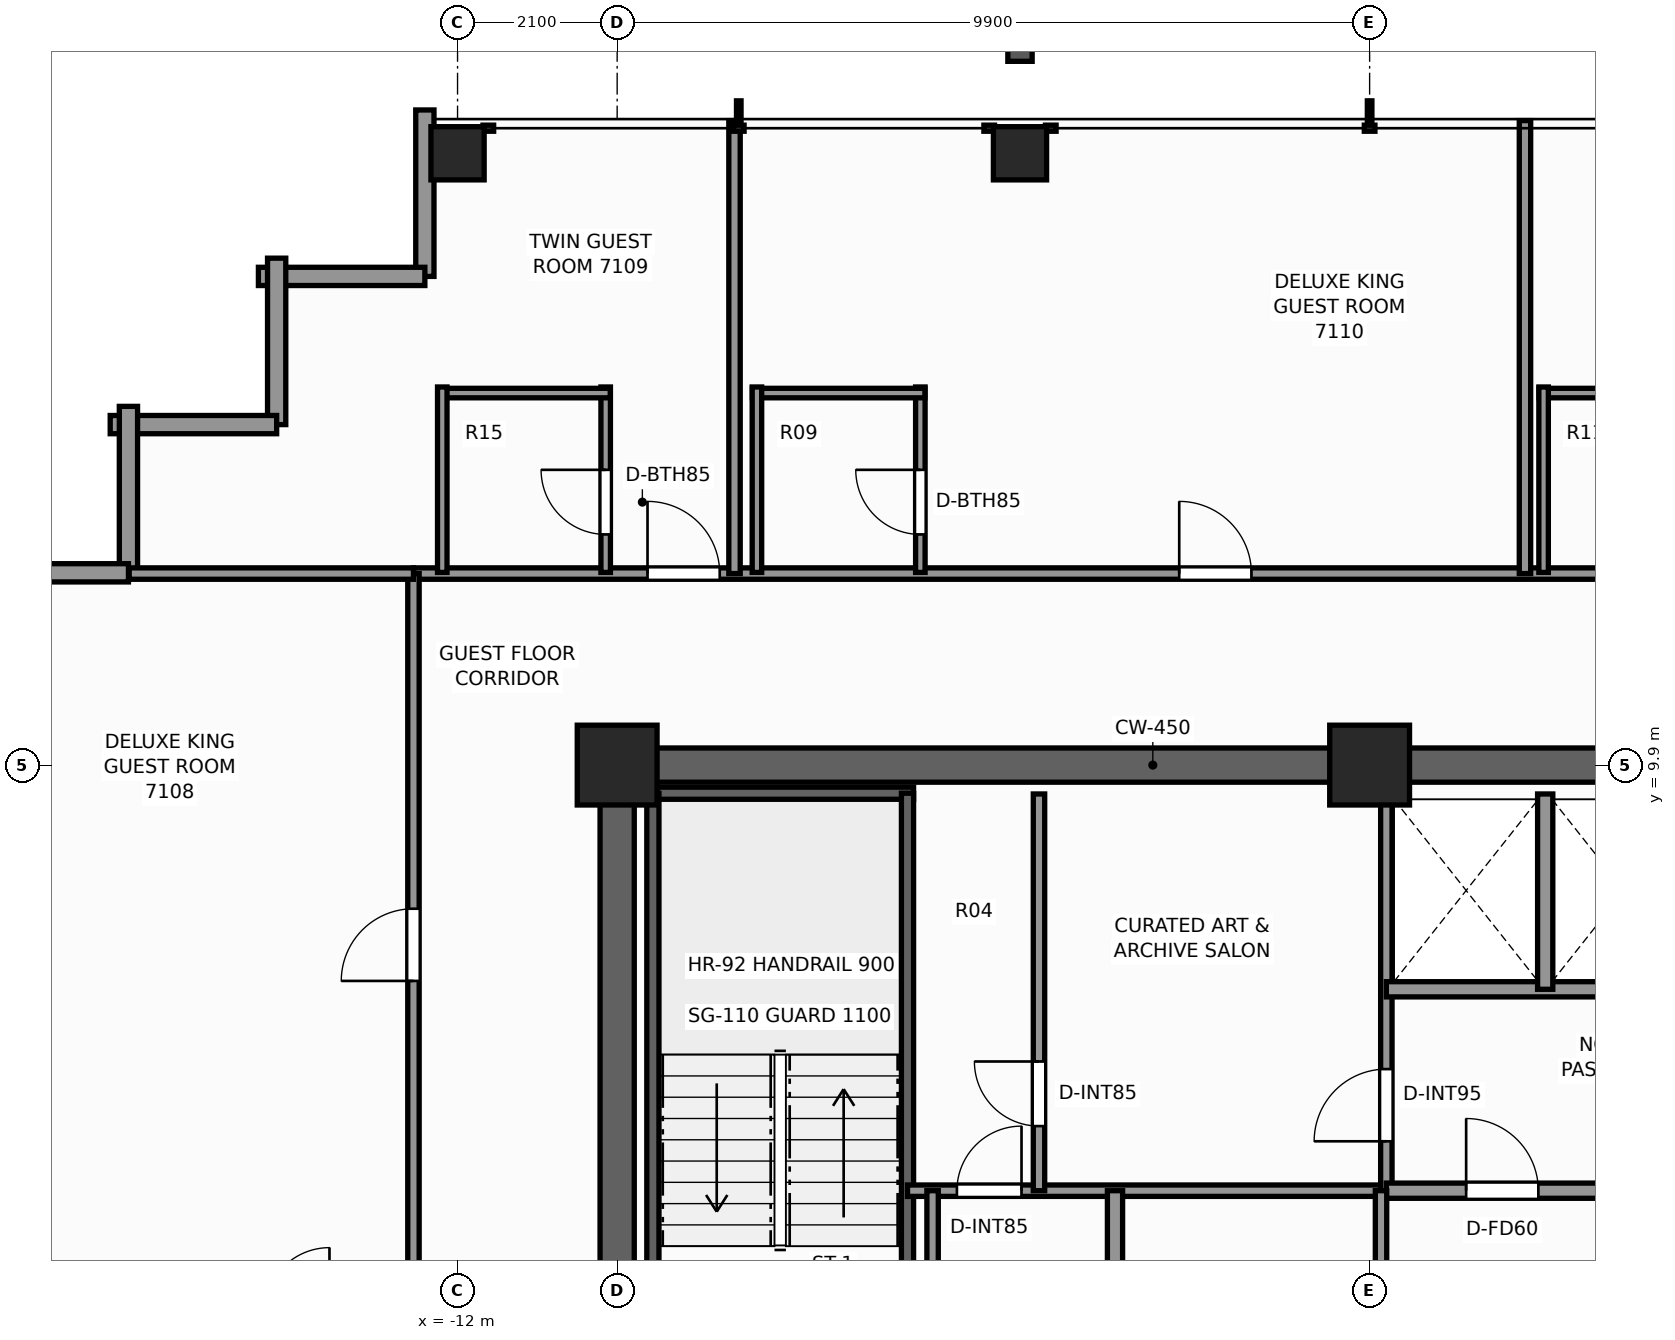
"""IFC4 building model, lengths in metres.
Left out: names, types, materials, properties, quantities, classifications, styles, units other than length and angle.
Written with IfcOpenShell. Run it as: python <this file> out.ifc"""

import sys

from ifc_helpers import new_model, si_unit, direction, frame, frame_2d, origin, origin_2d, place, context, subcontext, project, spatial, rectangle, extrude, element, fill, save


model = new_model("IFC4")
c1 = context("Model", 3, precision=1e-05, world=origin(), true_north=direction((0.0, 1.0)))
c2 = subcontext(c1, "Body", "Model", "MODEL_VIEW")
j1 = project(units=[si_unit("LENGTHUNIT", "METRE"), si_unit("PLANEANGLEUNIT", "RADIAN")], contexts=[c1])
p1 = place(None, origin())
s1 = spatial("IfcSite", under=j1, at=p1, CompositionType="ELEMENT")
p2 = place(p1, origin())
s2 = spatial("IfcBuilding", under=s1, at=p2, CompositionType="ELEMENT")
p3 = place(p2, frame((0.0, 0.0, 244.4)))
s3 = spatial("IfcBuildingStorey", under=s2, at=p3, CompositionType="ELEMENT", Elevation=244.4)
p4 = place(p3, frame((-10.125, 9.9, 0.0), z_axis=(0.0, 0.0, 1.0), x_axis=(1.0, 0.0, 0.0)))
e1 = element("IfcWall", 1, at=p4, inside=s3, PredefinedType="SHEAR", context=c2, shape_type="SweptSolid", body=[
    extrude(rectangle(XDim=14.545, YDim=0.45, at=frame_2d((7.272, 0.0))), origin(), (0.0, 0.0, 1.0), 3.5),
])
p5 = place(p3, frame((-9.9, -3.7, 0.0), z_axis=(0.0, 0.0, 1.0), x_axis=(0.0, 1.0, 0.0)))
e2 = element("IfcWall", 2, at=p5, inside=s3, PredefinedType="SHEAR", context=c2, shape_type="SweptSolid", body=[
    extrude(rectangle(XDim=13.375, YDim=0.45, at=frame_2d((6.688, 0.0))), origin(), (0.0, 0.0, 1.0), 3.5),
])
p6 = place(p5, frame((0.35, 0.0, 0.0)))
e3 = element("IfcOpeningElement", 3, at=p6, cuts=e2, PredefinedType="OPENING", context=c2, shape_type="SweptSolid", body=[
    extrude(rectangle(XDim=1.1, YDim=2.2, at=frame_2d((0.55, 1.1))), frame((0.0, 0.235, 0.0), z_axis=(0.0, -1.0, 0.0), x_axis=(1.0, 0.0, 0.0)), (0.0, 0.0, 1.0), 0.47),
])
for number, where, z_axis, x_axis in (
    (4, (-9.9, 9.9, 0.0), (0.0, 0.0, 1.0), (1.0, 0.0, 0.0)),
    (5, (0.0, 9.9, 0.0), (0.0, 0.0, 1.0), (1.0, 0.0, 0.0)),
):
    element("IfcColumn", number, at=place(p3, frame(where, z_axis=z_axis, x_axis=x_axis)), inside=s3, PredefinedType="COLUMN", context=c2, shape_type="SweptSolid", body=[
        extrude(rectangle(XDim=1.05, YDim=1.05, at=origin_2d()), origin(), (0.0, 0.0, 1.0), 3.5),
    ])
for number, where, z_axis, x_axis in (
    (6, (-12.0, 17.95, 0.0), (0.0, 0.0, 1.0), (1.0, 0.0, 0.0)),
    (7, (-4.6, 17.95, 0.0), (0.0, 0.0, 1.0), (1.0, 0.0, 0.0)),
):
    element("IfcColumn", number, at=place(p3, frame(where, z_axis=z_axis, x_axis=x_axis)), inside=s3, PredefinedType="COLUMN", context=c2, shape_type="SweptSolid", body=[
        extrude(rectangle(XDim=0.7, YDim=0.7, at=origin_2d()), origin(), (0.0, 0.0, 1.0), 3.5),
    ])
p7 = place(p3, frame((-12.43, 16.33, 0.0), z_axis=(0.0, 0.0, 1.0), x_axis=(0.0, 1.0, 0.0)))
e8 = element("IfcWall", 8, at=p7, inside=s3, PredefinedType="STANDARD", context=c2, shape_type="SweptSolid", body=[
    extrude(rectangle(XDim=2.19, YDim=0.24, at=frame_2d((1.095, 0.0))), origin(), (0.0, 0.0, 1.0), 2.633),
])
for number, where, z_axis, x_axis in (
    (9, (-14.62, 16.33, 0.0), (0.0, 0.0, 1.0), (1.0, 0.0, 0.0)),
    (10, (-14.38, 14.38, 0.0), (0.0, 0.0, 1.0), (0.0, 1.0, 0.0)),
    (11, (-16.57, 14.38, 0.0), (0.0, 0.0, 1.0), (1.0, 0.0, 0.0)),
    (12, (-16.33, 12.43, 0.0), (0.0, 0.0, 1.0), (0.0, 1.0, 0.0)),
):
    element("IfcWall", number, at=place(p3, frame(where, z_axis=z_axis, x_axis=x_axis)), inside=s3, PredefinedType="STANDARD", context=c2, shape_type="SweptSolid", body=[
        extrude(rectangle(XDim=2.19, YDim=0.24, at=frame_2d((1.095, 0.0))), origin(), (0.0, 0.0, 1.0), 2.633),
    ])
p8 = place(p3, frame((-18.52, 12.43, 0.0), z_axis=(0.0, 0.0, 1.0), x_axis=(1.0, 0.0, 0.0)))
e13 = element("IfcWall", 13, at=p8, inside=s3, PredefinedType="STANDARD", context=c2, shape_type="SweptSolid", body=[
    extrude(rectangle(XDim=2.19, YDim=0.24, at=frame_2d((1.095, 0.0))), origin(), (0.0, 0.0, 1.0), 2.633),
])
p9 = place(p3, frame((-9.52, 9.53, 0.0), z_axis=(0.0, 0.0, 1.0), x_axis=(1.0, 0.0, 0.0)))
e14 = element("IfcWall", 14, at=p9, inside=s3, PredefinedType="SHEAR", context=c2, shape_type="SweptSolid", body=[
    extrude(rectangle(XDim=3.52, YDim=0.16, at=frame_2d((1.76, 0.0))), origin(), (0.0, 0.0, 1.0), 3.5),
])
for number, where, z_axis, x_axis in (
    (15, (-9.43, 1.97, 0.0), (0.0, 0.0, 1.0), (0.0, 1.0, 0.0)),
    (16, (-6.08, 1.97, 0.0), (0.0, 0.0, 1.0), (0.0, 1.0, 0.0)),
):
    element("IfcWall", number, at=place(p3, frame(where, z_axis=z_axis, x_axis=x_axis)), inside=s3, PredefinedType="SHEAR", context=c2, shape_type="SweptSolid", body=[
        extrude(rectangle(XDim=7.56, YDim=0.16, at=frame_2d((3.78, 0.0))), origin(), (0.0, 0.0, 1.0), 3.5),
    ])
p10 = place(p3, frame((-6.08, 4.3, 0.0), z_axis=(0.0, 0.0, 1.0), x_axis=(1.0, 0.0, 0.0)))
e17 = element("IfcWall", 17, at=p10, inside=s3, PredefinedType="PARTITIONING", context=c2, shape_type="SweptSolid", body=[
    extrude(rectangle(XDim=6.3, YDim=0.15, at=frame_2d((3.15, 0.0))), origin(), (0.0, 0.0, 1.0), 3.25),
])
p11 = place(p10, frame((0.65, 0.0, 0.0)))
e18 = element("IfcOpeningElement", 18, at=p11, cuts=e17, PredefinedType="OPENING", context=c2, shape_type="SweptSolid", body=[
    extrude(rectangle(XDim=0.85, YDim=2.03, at=frame_2d((0.425, 1.015))), frame((0.0, 0.085, 0.0), z_axis=(0.0, -1.0, 0.0), x_axis=(1.0, 0.0, 0.0)), (0.0, 0.0, 1.0), 0.17),
])
p12 = place(p3, frame((0.22, 4.3, 0.0), z_axis=(0.0, 0.0, 1.0), x_axis=(0.0, 1.0, 0.0)))
e19 = element("IfcWall", 19, at=p12, inside=s3, PredefinedType="PARTITIONING", context=c2, shape_type="SweptSolid", body=[
    extrude(rectangle(XDim=5.22, YDim=0.15, at=frame_2d((2.61, 0.0))), origin(), (0.0, 0.0, 1.0), 3.25),
])
p13 = place(p12, frame((0.65, 0.0, 0.0)))
e20 = element("IfcOpeningElement", 20, at=p13, cuts=e19, PredefinedType="OPENING", context=c2, shape_type="SweptSolid", body=[
    extrude(rectangle(XDim=0.95, YDim=2.06, at=frame_2d((0.475, 1.03))), frame((0.0, 0.085, 0.0), z_axis=(0.0, -1.0, 0.0), x_axis=(1.0, 0.0, 0.0)), (0.0, 0.0, 1.0), 0.17),
])
p14 = place(p3, frame((-4.35, 4.3, 0.0), z_axis=(0.0, 0.0, 1.0), x_axis=(0.0, 1.0, 0.0)))
e21 = element("IfcWall", 21, at=p14, inside=s3, PredefinedType="PARTITIONING", context=c2, shape_type="SweptSolid", body=[
    extrude(rectangle(XDim=5.22, YDim=0.15, at=frame_2d((2.61, 0.0))), origin(), (0.0, 0.0, 1.0), 3.25),
])
p15 = place(p14, frame((0.85, 0.0, 0.0)))
e22 = element("IfcOpeningElement", 22, at=p15, cuts=e21, PredefinedType="OPENING", context=c2, shape_type="SweptSolid", body=[
    extrude(rectangle(XDim=0.85, YDim=2.03, at=frame_2d((0.425, 1.015))), frame((0.0, 0.085, 0.0), z_axis=(0.0, -1.0, 0.0), x_axis=(1.0, 0.0, 0.0)), (0.0, 0.0, 1.0), 0.17),
])
p16 = place(p3, frame((0.22, 6.95, 0.0), z_axis=(0.0, 0.0, 1.0), x_axis=(1.0, 0.0, 0.0)))
e23 = element("IfcWall", 23, at=p16, inside=s3, PredefinedType="SOLIDWALL", context=c2, shape_type="SweptSolid", body=[
    extrude(rectangle(XDim=4.18, YDim=0.2, at=frame_2d((2.09, 0.0))), origin(), (0.0, 0.0, 1.0), 3.25),
])
p17 = place(p3, frame((2.31, 6.95, 0.0), z_axis=(0.0, 0.0, 1.0), x_axis=(0.0, 1.0, 0.0)))
e24 = element("IfcWall", 24, at=p17, inside=s3, PredefinedType="SOLIDWALL", context=c2, shape_type="SweptSolid", body=[
    extrude(rectangle(XDim=2.57, YDim=0.2, at=frame_2d((1.285, 0.0))), origin(), (0.0, 0.0, 1.0), 3.25),
])
p18 = place(p3, frame((0.22, 4.3, 0.0), z_axis=(0.0, 0.0, 1.0), x_axis=(1.0, 0.0, 0.0)))
e25 = element("IfcWall", 25, at=p18, inside=s3, PredefinedType="SOLIDWALL", context=c2, shape_type="SweptSolid", body=[
    extrude(rectangle(XDim=3.13, YDim=0.2, at=frame_2d((1.565, 0.0))), origin(), (0.0, 0.0, 1.0), 3.25),
])
p19 = place(p18, frame((1.05, 0.0, 0.0)))
e26 = element("IfcOpeningElement", 26, at=p19, cuts=e25, PredefinedType="OPENING", context=c2, shape_type="SweptSolid", body=[
    extrude(rectangle(XDim=0.95, YDim=2.06, at=frame_2d((0.475, 1.03))), frame((0.0, 0.11, 0.0), z_axis=(0.0, -1.0, 0.0), x_axis=(1.0, 0.0, 0.0)), (0.0, 0.0, 1.0), 0.22),
])
p20 = place(p3, frame((-3.35, 1.1, 0.0), z_axis=(0.0, 0.0, 1.0), x_axis=(0.0, 1.0, 0.0)))
e27 = element("IfcWall", 27, at=p20, inside=s3, PredefinedType="SOLIDWALL", context=c2, shape_type="SweptSolid", body=[
    extrude(rectangle(XDim=3.2, YDim=0.2, at=frame_2d((1.6, 0.0))), origin(), (0.0, 0.0, 1.0), 3.25),
])
p21 = place(p3, frame((0.15, -1.7, 0.0), z_axis=(0.0, 0.0, 1.0), x_axis=(0.0, 1.0, 0.0)))
e28 = element("IfcWall", 28, at=p21, inside=s3, PredefinedType="PARTITIONING", context=c2, shape_type="SweptSolid", body=[
    extrude(rectangle(XDim=6.0, YDim=0.15, at=frame_2d((3.0, 0.0))), origin(), (0.0, 0.0, 1.0), 3.25),
])
p22 = place(p21, frame((3.6, 0.0, 0.0)))
e29 = element("IfcOpeningElement", 29, at=p22, cuts=e28, PredefinedType="OPENING", context=c2, shape_type="SweptSolid", body=[
    extrude(rectangle(XDim=0.85, YDim=2.03, at=frame_2d((0.425, 1.015))), frame((0.0, 0.085, 0.0), z_axis=(0.0, -1.0, 0.0), x_axis=(1.0, 0.0, 0.0)), (0.0, 0.0, 1.0), 0.17),
])
p23 = place(p3, frame((-5.75, 1.97, 0.0), z_axis=(0.0, 0.0, 1.0), x_axis=(0.0, 1.0, 0.0)))
e30 = element("IfcWall", 30, at=p23, inside=s3, PredefinedType="PARTITIONING", context=c2, shape_type="SweptSolid", body=[
    extrude(rectangle(XDim=2.33, YDim=0.15, at=frame_2d((1.165, 0.0))), origin(), (0.0, 0.0, 1.0), 3.25),
])
p24 = place(p3, frame((-12.58, 12.42, 0.0), z_axis=(0.0, 0.0, 1.0), x_axis=(1.0, 0.0, 0.0)))
e31 = element("IfcWall", 31, at=p24, inside=s3, PredefinedType="PARTITIONING", context=c2, shape_type="SweptSolid", body=[
    extrude(rectangle(XDim=24.84, YDim=0.15, at=frame_2d((12.42, 0.0))), origin(), (0.0, 0.0, 1.0), 2.539),
])
p25 = place(p24, frame((3.079, 0.0, 0.0)))
e32 = element("IfcOpeningElement", 32, at=p25, cuts=e31, PredefinedType="OPENING", context=c2, shape_type="SweptSolid", body=[
    extrude(rectangle(XDim=0.95, YDim=2.06, at=frame_2d((0.475, 1.03))), frame((0.0, 0.085, 0.0), z_axis=(0.0, -1.0, 0.0), x_axis=(1.0, 0.0, 0.0)), (0.0, 0.0, 1.0), 0.17),
])
p26 = place(p24, frame((10.075, 0.0, 0.0)))
e33 = element("IfcOpeningElement", 33, at=p26, cuts=e31, PredefinedType="OPENING", context=c2, shape_type="SweptSolid", body=[
    extrude(rectangle(XDim=0.95, YDim=2.06, at=frame_2d((0.475, 1.03))), frame((0.0, 0.085, 0.0), z_axis=(0.0, -1.0, 0.0), x_axis=(1.0, 0.0, 0.0)), (0.0, 0.0, 1.0), 0.17),
])
p27 = place(p24, frame((19.64, 0.0, 0.0)))
e34 = element("IfcOpeningElement", 34, at=p27, cuts=e31, PredefinedType="OPENING", context=c2, shape_type="SweptSolid", body=[
    extrude(rectangle(XDim=0.95, YDim=2.06, at=frame_2d((0.475, 1.03))), frame((0.0, 0.085, 0.0), z_axis=(0.0, -1.0, 0.0), x_axis=(1.0, 0.0, 0.0)), (0.0, 0.0, 1.0), 0.17),
])
p28 = place(p3, frame((-12.58, -12.42, 0.0), z_axis=(0.0, 0.0, 1.0), x_axis=(0.0, 1.0, 0.0)))
e35 = element("IfcWall", 35, at=p28, inside=s3, PredefinedType="PARTITIONING", context=c2, shape_type="SweptSolid", body=[
    extrude(rectangle(XDim=24.84, YDim=0.15, at=frame_2d((12.42, 0.0))), origin(), (0.0, 0.0, 1.0), 2.539),
])
p29 = place(p28, frame((4.475, 0.0, 0.0)))
e36 = element("IfcOpeningElement", 36, at=p29, cuts=e35, PredefinedType="OPENING", context=c2, shape_type="SweptSolid", body=[
    extrude(rectangle(XDim=0.95, YDim=2.06, at=frame_2d((0.475, 1.03))), frame((0.0, 0.085, 0.0), z_axis=(0.0, -1.0, 0.0), x_axis=(1.0, 0.0, 0.0)), (0.0, 0.0, 1.0), 0.17),
])
p30 = place(p28, frame((19.48, 0.0, 0.0)))
e37 = element("IfcOpeningElement", 37, at=p30, cuts=e35, PredefinedType="OPENING", context=c2, shape_type="SweptSolid", body=[
    extrude(rectangle(XDim=0.95, YDim=2.06, at=frame_2d((0.475, 1.03))), frame((0.0, 0.085, 0.0), z_axis=(0.0, -1.0, 0.0), x_axis=(1.0, 0.0, 0.0)), (0.0, 0.0, 1.0), 0.17),
])
p31 = place(p3, frame((-16.32, 12.42, 0.0), z_axis=(0.0, 0.0, 1.0), x_axis=(1.0, 0.0, 0.0)))
e38 = element("IfcWall", 38, at=p31, inside=s3, PredefinedType="PARTITIONING", context=c2, shape_type="SweptSolid", body=[
    extrude(rectangle(XDim=3.74, YDim=0.15, at=frame_2d((1.87, 0.0))), origin(), (0.0, 0.0, 1.0), 3.25),
])
p32 = place(p3, frame((-8.356, 12.42, 0.0), z_axis=(0.0, 0.0, 1.0), x_axis=(0.0, 1.0, 0.0)))
e39 = element("IfcWall", 39, at=p32, inside=s3, PredefinedType="PARTITIONING", context=c2, shape_type="SweptSolid", body=[
    extrude(rectangle(XDim=5.96, YDim=0.15, at=frame_2d((2.98, 0.0))), origin(), (0.0, 0.0, 1.0), 2.623),
])
p33 = place(p3, frame((-10.051, 12.435, 0.0), z_axis=(0.0, 0.0, 1.0), x_axis=(0.0, 1.0, 0.0)))
e40 = element("IfcWall", 40, at=p33, inside=s3, PredefinedType="PARTITIONING", context=c2, shape_type="SweptSolid", body=[
    extrude(rectangle(XDim=2.44, YDim=0.125, at=frame_2d((1.22, 0.0))), origin(), (0.0, 0.0, 1.0), 3.25),
])
p34 = place(p33, frame((0.5, 0.0, 0.0)))
e41 = element("IfcOpeningElement", 41, at=p34, cuts=e40, PredefinedType="OPENING", context=c2, shape_type="SweptSolid", body=[
    extrude(rectangle(XDim=0.85, YDim=2.03, at=frame_2d((0.425, 1.015))), frame((0.0, 0.073, 0.0), z_axis=(0.0, -1.0, 0.0), x_axis=(1.0, 0.0, 0.0)), (0.0, 0.0, 1.0), 0.145),
])
p35 = place(p3, frame((-12.261, 14.795, 0.0), z_axis=(0.0, 0.0, 1.0), x_axis=(1.0, 0.0, 0.0)))
e42 = element("IfcWall", 42, at=p35, inside=s3, PredefinedType="PARTITIONING", context=c2, shape_type="SweptSolid", body=[
    extrude(rectangle(XDim=2.27, YDim=0.125, at=frame_2d((1.135, 0.0))), origin(), (0.0, 0.0, 1.0), 2.539),
])
p36 = place(p3, frame((-12.201, 12.435, 0.0), z_axis=(0.0, 0.0, 1.0), x_axis=(0.0, 1.0, 0.0)))
e43 = element("IfcWall", 43, at=p36, inside=s3, PredefinedType="PARTITIONING", context=c2, shape_type="SweptSolid", body=[
    extrude(rectangle(XDim=2.44, YDim=0.125, at=frame_2d((1.22, 0.0))), origin(), (0.0, 0.0, 1.0), 3.25),
])
p37 = place(p3, frame((2.044, 12.42, 0.0), z_axis=(0.0, 0.0, 1.0), x_axis=(0.0, 1.0, 0.0)))
e44 = element("IfcWall", 44, at=p37, inside=s3, PredefinedType="PARTITIONING", context=c2, shape_type="SweptSolid", body=[
    extrude(rectangle(XDim=5.96, YDim=0.15, at=frame_2d((2.98, 0.0))), origin(), (0.0, 0.0, 1.0), 2.623),
])
p38 = place(p3, frame((-5.911, 12.435, 0.0), z_axis=(0.0, 0.0, 1.0), x_axis=(0.0, 1.0, 0.0)))
e45 = element("IfcWall", 45, at=p38, inside=s3, PredefinedType="PARTITIONING", context=c2, shape_type="SweptSolid", body=[
    extrude(rectangle(XDim=2.44, YDim=0.125, at=frame_2d((1.22, 0.0))), origin(), (0.0, 0.0, 1.0), 3.25),
])
p39 = place(p38, frame((0.5, 0.0, 0.0)))
e46 = element("IfcOpeningElement", 46, at=p39, cuts=e45, PredefinedType="OPENING", context=c2, shape_type="SweptSolid", body=[
    extrude(rectangle(XDim=0.85, YDim=2.03, at=frame_2d((0.425, 1.015))), frame((0.0, 0.073, 0.0), z_axis=(0.0, -1.0, 0.0), x_axis=(1.0, 0.0, 0.0)), (0.0, 0.0, 1.0), 0.145),
])
p40 = place(p3, frame((-8.121, 14.795, 0.0), z_axis=(0.0, 0.0, 1.0), x_axis=(1.0, 0.0, 0.0)))
e47 = element("IfcWall", 47, at=p40, inside=s3, PredefinedType="PARTITIONING", context=c2, shape_type="SweptSolid", body=[
    extrude(rectangle(XDim=2.27, YDim=0.125, at=frame_2d((1.135, 0.0))), origin(), (0.0, 0.0, 1.0), 3.25),
])
p41 = place(p3, frame((-8.061, 12.435, 0.0), z_axis=(0.0, 0.0, 1.0), x_axis=(0.0, 1.0, 0.0)))
e48 = element("IfcWall", 48, at=p41, inside=s3, PredefinedType="PARTITIONING", context=c2, shape_type="SweptSolid", body=[
    extrude(rectangle(XDim=2.44, YDim=0.125, at=frame_2d((1.22, 0.0))), origin(), (0.0, 0.0, 1.0), 3.25),
])
p42 = place(p3, frame((2.229, 14.795, 0.0), z_axis=(0.0, 0.0, 1.0), x_axis=(1.0, 0.0, 0.0)))
e49 = element("IfcWall", 49, at=p42, inside=s3, PredefinedType="PARTITIONING", context=c2, shape_type="SweptSolid", body=[
    extrude(rectangle(XDim=2.27, YDim=0.125, at=frame_2d((1.135, 0.0))), origin(), (0.0, 0.0, 1.0), 2.539),
])
p43 = place(p3, frame((2.289, 12.435, 0.0), z_axis=(0.0, 0.0, 1.0), x_axis=(0.0, 1.0, 0.0)))
e50 = element("IfcWall", 50, at=p43, inside=s3, PredefinedType="PARTITIONING", context=c2, shape_type="SweptSolid", body=[
    extrude(rectangle(XDim=2.44, YDim=0.125, at=frame_2d((1.22, 0.0))), origin(), (0.0, 0.0, 1.0), 3.25),
])
p44 = place(p13, origin())
e51 = element("IfcDoor", 51, at=p44, inside=s3, OperationType="SINGLE_SWING_LEFT", PredefinedType="DOOR", context=c2, shape_type="SweptSolid", body=[
    extrude(rectangle(XDim=0.95, YDim=2.06, at=frame_2d((0.475, 1.03))), frame((0.0, 0.025, 0.0), z_axis=(0.0, -1.0, 0.0), x_axis=(1.0, 0.0, 0.0)), (0.0, 0.0, 1.0), 0.05),
])
fill(e20, e51)
p45 = place(p15, origin())
e52 = element("IfcDoor", 52, at=p45, inside=s3, OperationType="SINGLE_SWING_RIGHT", PredefinedType="DOOR", context=c2, shape_type="SweptSolid", body=[
    extrude(rectangle(XDim=0.85, YDim=2.03, at=frame_2d((0.425, 1.015))), frame((0.0, 0.025, 0.0), z_axis=(0.0, -1.0, 0.0), x_axis=(1.0, 0.0, 0.0)), (0.0, 0.0, 1.0), 0.05),
])
fill(e22, e52)
p46 = place(p19, origin())
e53 = element("IfcDoor", 53, at=p46, inside=s3, OperationType="SINGLE_SWING_LEFT", PredefinedType="DOOR", context=c2, shape_type="SweptSolid", body=[
    extrude(rectangle(XDim=0.95, YDim=2.06, at=frame_2d((0.475, 1.03))), frame((0.0, 0.025, 0.0), z_axis=(0.0, -1.0, 0.0), x_axis=(1.0, 0.0, 0.0)), (0.0, 0.0, 1.0), 0.05),
])
fill(e26, e53)
p47 = place(p11, origin())
e54 = element("IfcDoor", 54, at=p47, inside=s3, OperationType="SINGLE_SWING_RIGHT", PredefinedType="DOOR", context=c2, shape_type="SweptSolid", body=[
    extrude(rectangle(XDim=0.85, YDim=2.03, at=frame_2d((0.425, 1.015))), frame((0.0, 0.025, 0.0), z_axis=(0.0, -1.0, 0.0), x_axis=(1.0, 0.0, 0.0)), (0.0, 0.0, 1.0), 0.05),
])
fill(e18, e54)
p48 = place(p30, origin())
e55 = element("IfcDoor", 55, at=p48, inside=s3, OperationType="SINGLE_SWING_LEFT", PredefinedType="DOOR", context=c2, shape_type="SweptSolid", body=[
    extrude(rectangle(XDim=0.95, YDim=2.06, at=frame_2d((0.475, 1.03))), frame((0.0, 0.025, 0.0), z_axis=(0.0, -1.0, 0.0), x_axis=(1.0, 0.0, 0.0)), (0.0, 0.0, 1.0), 0.05),
])
fill(e37, e55)
p49 = place(p34, origin())
e56 = element("IfcDoor", 56, at=p49, inside=s3, OperationType="SINGLE_SWING_RIGHT", PredefinedType="DOOR", context=c2, shape_type="SweptSolid", body=[
    extrude(rectangle(XDim=0.85, YDim=2.03, at=frame_2d((0.425, 1.015))), frame((0.0, 0.025, 0.0), z_axis=(0.0, -1.0, 0.0), x_axis=(1.0, 0.0, 0.0)), (0.0, 0.0, 1.0), 0.05),
])
fill(e41, e56)
p50 = place(p25, origin())
e57 = element("IfcDoor", 57, at=p50, inside=s3, OperationType="SINGLE_SWING_LEFT", PredefinedType="DOOR", context=c2, shape_type="SweptSolid", body=[
    extrude(rectangle(XDim=0.95, YDim=2.06, at=frame_2d((0.475, 1.03))), frame((0.0, 0.025, 0.0), z_axis=(0.0, -1.0, 0.0), x_axis=(1.0, 0.0, 0.0)), (0.0, 0.0, 1.0), 0.05),
])
fill(e32, e57)
p51 = place(p39, origin())
e58 = element("IfcDoor", 58, at=p51, inside=s3, OperationType="SINGLE_SWING_RIGHT", PredefinedType="DOOR", context=c2, shape_type="SweptSolid", body=[
    extrude(rectangle(XDim=0.85, YDim=2.03, at=frame_2d((0.425, 1.015))), frame((0.0, 0.025, 0.0), z_axis=(0.0, -1.0, 0.0), x_axis=(1.0, 0.0, 0.0)), (0.0, 0.0, 1.0), 0.05),
])
fill(e46, e58)
p52 = place(p26, origin())
e59 = element("IfcDoor", 59, at=p52, inside=s3, OperationType="SINGLE_SWING_LEFT", PredefinedType="DOOR", context=c2, shape_type="SweptSolid", body=[
    extrude(rectangle(XDim=0.95, YDim=2.06, at=frame_2d((0.475, 1.03))), frame((0.0, 0.025, 0.0), z_axis=(0.0, -1.0, 0.0), x_axis=(1.0, 0.0, 0.0)), (0.0, 0.0, 1.0), 0.05),
])
fill(e33, e59)
save(model, sys.argv[1])
